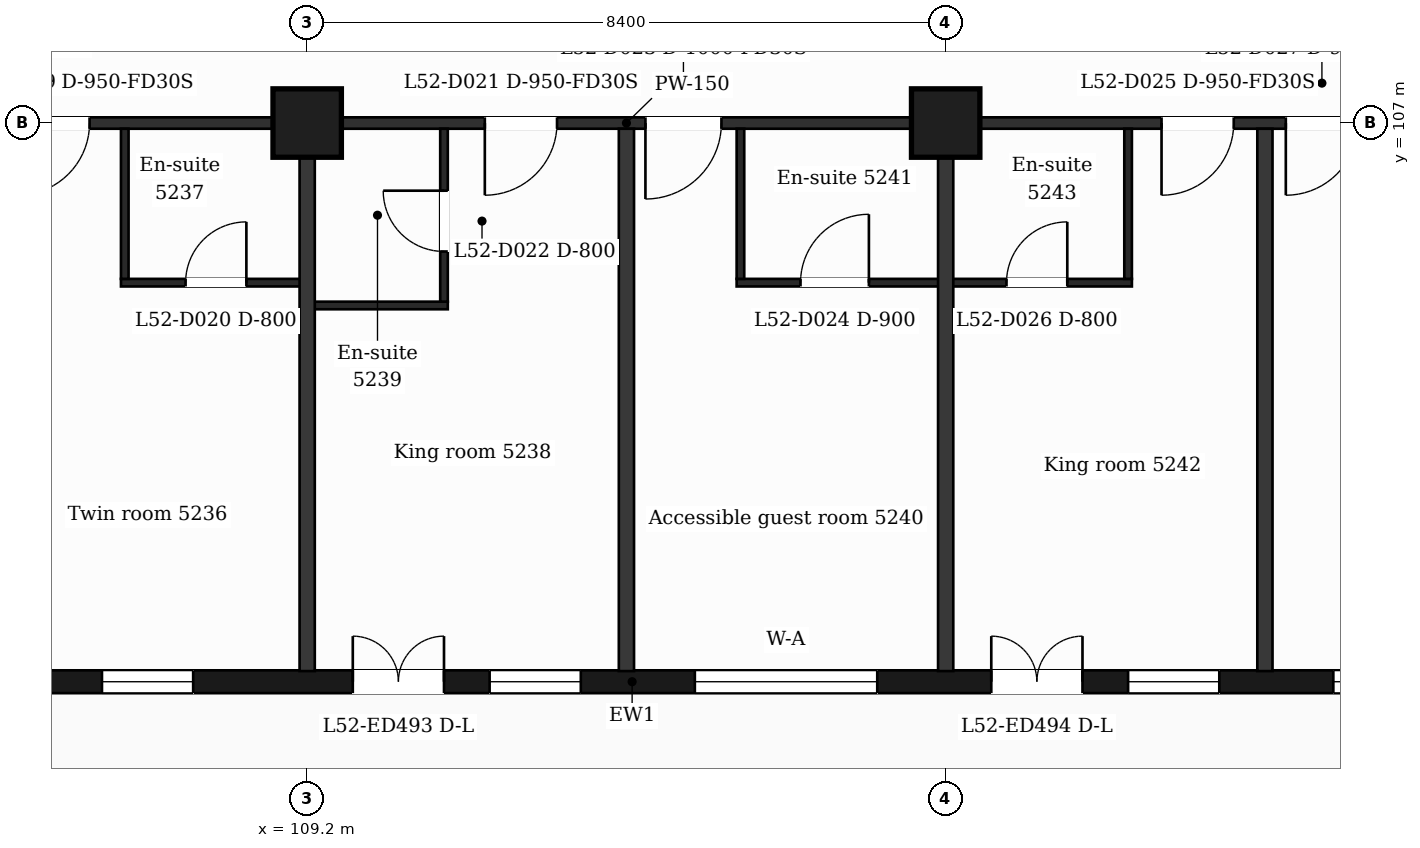
"""IFC4 building model, lengths in metres.
Left out: names, types, materials, properties, quantities, classifications, styles, units other than length and angle.
Written with IfcOpenShell. Run it as: python <this file> out.ifc"""

import sys

from ifc_helpers import new_model, si_unit, direction, frame, frame_2d, origin, origin_2d, place, context, subcontext, project, spatial, rectangle, extrude, element, fill, save


model = new_model("IFC4")
c1 = context("Model", 3, precision=1e-05, world=origin(), true_north=direction((0.0, 1.0)))
c2 = subcontext(c1, "Body", "Model", "MODEL_VIEW")
j1 = project(units=[si_unit("LENGTHUNIT", "METRE"), si_unit("PLANEANGLEUNIT", "RADIAN")], contexts=[c1])
p1 = place(None, origin())
s1 = spatial("IfcSite", under=j1, at=p1, CompositionType="ELEMENT")
p2 = place(p1, origin())
s2 = spatial("IfcBuilding", under=s1, at=p2, CompositionType="ELEMENT")
p3 = place(p2, frame((0.0, 0.0, 217.0)))
s3 = spatial("IfcBuildingStorey", under=s2, at=p3, CompositionType="ELEMENT", Elevation=217.0)
for number, where, z_axis, x_axis in (
    (1, (109.2, 107.0, 0.0), (0.0, 0.0, 1.0), (1.0, 0.0, 0.0)),
    (2, (117.6, 107.0, 0.0), (0.0, 0.0, 1.0), (1.0, 0.0, 0.0)),
):
    element("IfcColumn", number, at=place(p3, frame(where, z_axis=z_axis, x_axis=x_axis)), inside=s3, PredefinedType="COLUMN", context=c2, shape_type="SweptSolid", body=[
        extrude(rectangle(XDim=0.9, YDim=0.9, at=origin_2d()), origin(), (0.0, 0.0, 1.0), 3.7),
    ])
p4 = place(p3, frame((89.85, 99.65, 0.0), z_axis=(0.0, 0.0, 1.0), x_axis=(1.0, 0.0, 0.0)))
e3 = element("IfcWall", 3, at=p4, inside=s3, PredefinedType="SOLIDWALL", context=c2, shape_type="SweptSolid", body=[
    extrude(rectangle(XDim=47.25, YDim=0.3, at=frame_2d((23.625, 0.0))), origin(), (0.0, 0.0, 1.0), 3.38),
])
p5 = place(p4, frame((0.725, 0.0, 0.9)))
e4 = element("IfcOpeningElement", 4, at=p5, cuts=e3, PredefinedType="OPENING", context=c2, shape_type="SweptSolid", body=[
    extrude(rectangle(XDim=1.2, YDim=2.1, at=frame_2d((0.6, 1.05))), frame((0.0, 0.16, 0.0), z_axis=(0.0, -1.0, 0.0), x_axis=(1.0, 0.0, 0.0)), (0.0, 0.0, 1.0), 0.32),
])
p6 = place(p4, frame((3.45, 0.0, 0.9)))
e5 = element("IfcOpeningElement", 5, at=p6, cuts=e3, PredefinedType="OPENING", context=c2, shape_type="SweptSolid", body=[
    extrude(rectangle(XDim=2.4, YDim=2.1, at=frame_2d((1.2, 1.05))), frame((0.0, 0.16, 0.0), z_axis=(0.0, -1.0, 0.0), x_axis=(1.0, 0.0, 0.0)), (0.0, 0.0, 1.0), 0.32),
])
p7 = place(p4, frame((7.65, 0.0, 0.9)))
e6 = element("IfcOpeningElement", 6, at=p7, cuts=e3, PredefinedType="OPENING", context=c2, shape_type="SweptSolid", body=[
    extrude(rectangle(XDim=2.4, YDim=2.1, at=frame_2d((1.2, 1.05))), frame((0.0, 0.16, 0.0), z_axis=(0.0, -1.0, 0.0), x_axis=(1.0, 0.0, 0.0)), (0.0, 0.0, 1.0), 0.32),
])
p8 = place(p4, frame((12.45, 0.0, 0.9)))
e7 = element("IfcOpeningElement", 7, at=p8, cuts=e3, PredefinedType="OPENING", context=c2, shape_type="SweptSolid", body=[
    extrude(rectangle(XDim=1.2, YDim=2.1, at=frame_2d((0.6, 1.05))), frame((0.0, 0.16, 0.0), z_axis=(0.0, -1.0, 0.0), x_axis=(1.0, 0.0, 0.0)), (0.0, 0.0, 1.0), 0.32),
])
p9 = place(p4, frame((16.65, 0.0, 0.9)))
e8 = element("IfcOpeningElement", 8, at=p9, cuts=e3, PredefinedType="OPENING", context=c2, shape_type="SweptSolid", body=[
    extrude(rectangle(XDim=1.2, YDim=2.1, at=frame_2d((0.6, 1.05))), frame((0.0, 0.16, 0.0), z_axis=(0.0, -1.0, 0.0), x_axis=(1.0, 0.0, 0.0)), (0.0, 0.0, 1.0), 0.32),
])
p10 = place(p4, frame((19.95, 0.0, 0.0)))
e9 = element("IfcOpeningElement", 9, at=p10, cuts=e3, PredefinedType="OPENING", context=c2, shape_type="SweptSolid", body=[
    extrude(rectangle(XDim=1.2, YDim=2.4, at=frame_2d((0.6, 1.2))), frame((0.0, 0.16, 0.0), z_axis=(0.0, -1.0, 0.0), x_axis=(1.0, 0.0, 0.0)), (0.0, 0.0, 1.0), 0.32),
])
p11 = place(p4, frame((21.75, 0.0, 0.9)))
e10 = element("IfcOpeningElement", 10, at=p11, cuts=e3, PredefinedType="OPENING", context=c2, shape_type="SweptSolid", body=[
    extrude(rectangle(XDim=1.2, YDim=2.1, at=frame_2d((0.6, 1.05))), frame((0.0, 0.16, 0.0), z_axis=(0.0, -1.0, 0.0), x_axis=(1.0, 0.0, 0.0)), (0.0, 0.0, 1.0), 0.32),
])
p12 = place(p4, frame((24.45, 0.0, 0.9)))
e11 = element("IfcOpeningElement", 11, at=p12, cuts=e3, PredefinedType="OPENING", context=c2, shape_type="SweptSolid", body=[
    extrude(rectangle(XDim=2.4, YDim=2.1, at=frame_2d((1.2, 1.05))), frame((0.0, 0.16, 0.0), z_axis=(0.0, -1.0, 0.0), x_axis=(1.0, 0.0, 0.0)), (0.0, 0.0, 1.0), 0.32),
])
p13 = place(p4, frame((28.35, 0.0, 0.0)))
e12 = element("IfcOpeningElement", 12, at=p13, cuts=e3, PredefinedType="OPENING", context=c2, shape_type="SweptSolid", body=[
    extrude(rectangle(XDim=1.2, YDim=2.4, at=frame_2d((0.6, 1.2))), frame((0.0, 0.16, 0.0), z_axis=(0.0, -1.0, 0.0), x_axis=(1.0, 0.0, 0.0)), (0.0, 0.0, 1.0), 0.32),
])
p14 = place(p4, frame((30.15, 0.0, 0.9)))
e13 = element("IfcOpeningElement", 13, at=p14, cuts=e3, PredefinedType="OPENING", context=c2, shape_type="SweptSolid", body=[
    extrude(rectangle(XDim=1.2, YDim=2.1, at=frame_2d((0.6, 1.05))), frame((0.0, 0.16, 0.0), z_axis=(0.0, -1.0, 0.0), x_axis=(1.0, 0.0, 0.0)), (0.0, 0.0, 1.0), 0.32),
])
p15 = place(p4, frame((32.85, 0.0, 0.9)))
e14 = element("IfcOpeningElement", 14, at=p15, cuts=e3, PredefinedType="OPENING", context=c2, shape_type="SweptSolid", body=[
    extrude(rectangle(XDim=2.4, YDim=2.1, at=frame_2d((1.2, 1.05))), frame((0.0, 0.16, 0.0), z_axis=(0.0, -1.0, 0.0), x_axis=(1.0, 0.0, 0.0)), (0.0, 0.0, 1.0), 0.32),
])
p16 = place(p4, frame((37.05, 0.0, 0.9)))
e15 = element("IfcOpeningElement", 15, at=p16, cuts=e3, PredefinedType="OPENING", context=c2, shape_type="SweptSolid", body=[
    extrude(rectangle(XDim=2.4, YDim=2.1, at=frame_2d((1.2, 1.05))), frame((0.0, 0.16, 0.0), z_axis=(0.0, -1.0, 0.0), x_axis=(1.0, 0.0, 0.0)), (0.0, 0.0, 1.0), 0.32),
])
p17 = place(p4, frame((41.85, 0.0, 0.9)))
e16 = element("IfcOpeningElement", 16, at=p17, cuts=e3, PredefinedType="OPENING", context=c2, shape_type="SweptSolid", body=[
    extrude(rectangle(XDim=1.2, YDim=2.1, at=frame_2d((0.6, 1.05))), frame((0.0, 0.16, 0.0), z_axis=(0.0, -1.0, 0.0), x_axis=(1.0, 0.0, 0.0)), (0.0, 0.0, 1.0), 0.32),
])
p18 = place(p4, frame((45.25, 0.0, 0.9)))
e17 = element("IfcOpeningElement", 17, at=p18, cuts=e3, PredefinedType="OPENING", context=c2, shape_type="SweptSolid", body=[
    extrude(rectangle(XDim=1.2, YDim=2.1, at=frame_2d((0.6, 1.05))), frame((0.0, 0.16, 0.0), z_axis=(0.0, -1.0, 0.0), x_axis=(1.0, 0.0, 0.0)), (0.0, 0.0, 1.0), 0.32),
])
p19 = place(p3, frame((109.2, 104.6, 0.0), z_axis=(0.0, 0.0, 1.0), x_axis=(1.0, 0.0, 0.0)))
e18 = element("IfcWall", 18, at=p19, inside=s3, PredefinedType="PARTITIONING", context=c2, shape_type="SweptSolid", body=[
    extrude(rectangle(XDim=1.85, YDim=0.1, at=frame_2d((0.925, 0.0))), origin(), (0.0, 0.0, 1.0), 3.38),
])
p20 = place(p3, frame((106.75, 104.9, 0.0), z_axis=(0.0, 0.0, 1.0), x_axis=(1.0, 0.0, 0.0)))
e19 = element("IfcWall", 19, at=p20, inside=s3, PredefinedType="PARTITIONING", context=c2, shape_type="SweptSolid", body=[
    extrude(rectangle(XDim=2.45, YDim=0.1, at=frame_2d((1.225, 0.0))), origin(), (0.0, 0.0, 1.0), 3.38),
])
p21 = place(p20, frame((0.85, 0.0, 0.0)))
e20 = element("IfcOpeningElement", 20, at=p21, cuts=e19, PredefinedType="OPENING", context=c2, shape_type="SweptSolid", body=[
    extrude(rectangle(XDim=0.8, YDim=2.1, at=frame_2d((0.4, 1.05))), frame((0.0, 0.06, 0.0), z_axis=(0.0, -1.0, 0.0), x_axis=(1.0, 0.0, 0.0)), (0.0, 0.0, 1.0), 0.12),
])
p22 = place(p3, frame((114.85, 104.9, 0.0), z_axis=(0.0, 0.0, 1.0), x_axis=(1.0, 0.0, 0.0)))
e21 = element("IfcWall", 21, at=p22, inside=s3, PredefinedType="PARTITIONING", context=c2, shape_type="SweptSolid", body=[
    extrude(rectangle(XDim=5.2, YDim=0.1, at=frame_2d((2.6, 0.0))), origin(), (0.0, 0.0, 1.0), 3.38),
])
p23 = place(p22, frame((0.84, 0.0, 0.0)))
e22 = element("IfcOpeningElement", 22, at=p23, cuts=e21, PredefinedType="OPENING", context=c2, shape_type="SweptSolid", body=[
    extrude(rectangle(XDim=0.9, YDim=2.1, at=frame_2d((0.45, 1.05))), frame((0.0, 0.06, 0.0), z_axis=(0.0, -1.0, 0.0), x_axis=(1.0, 0.0, 0.0)), (0.0, 0.0, 1.0), 0.12),
])
p24 = place(p22, frame((3.55, 0.0, 0.0)))
e23 = element("IfcOpeningElement", 23, at=p24, cuts=e21, PredefinedType="OPENING", context=c2, shape_type="SweptSolid", body=[
    extrude(rectangle(XDim=0.8, YDim=2.1, at=frame_2d((0.4, 1.05))), frame((0.0, 0.06, 0.0), z_axis=(0.0, -1.0, 0.0), x_axis=(1.0, 0.0, 0.0)), (0.0, 0.0, 1.0), 0.12),
])
p25 = place(p3, frame((87.018, 107.0, 0.0), z_axis=(0.0, 0.0, 1.0), x_axis=(1.0, 0.0, 0.0)))
e24 = element("IfcWall", 24, at=p25, inside=s3, PredefinedType="PARTITIONING", context=c2, shape_type="SweptSolid", body=[
    extrude(rectangle(XDim=52.765, YDim=0.15, at=frame_2d((26.382, 0.0))), origin(), (0.0, 0.0, 1.0), 3.38),
])
p26 = place(p25, frame((1.276, 0.0, 0.0)))
e25 = element("IfcOpeningElement", 25, at=p26, cuts=e24, PredefinedType="OPENING", context=c2, shape_type="SweptSolid", body=[
    extrude(rectangle(XDim=0.95, YDim=2.1, at=frame_2d((0.475, 1.05))), frame((0.0, 0.085, 0.0), z_axis=(0.0, -1.0, 0.0), x_axis=(1.0, 0.0, 0.0)), (0.0, 0.0, 1.0), 0.17),
])
p27 = place(p25, frame((6.034, 0.0, 0.0)))
e26 = element("IfcOpeningElement", 26, at=p27, cuts=e24, PredefinedType="OPENING", context=c2, shape_type="SweptSolid", body=[
    extrude(rectangle(XDim=0.95, YDim=2.1, at=frame_2d((0.475, 1.05))), frame((0.0, 0.085, 0.0), z_axis=(0.0, -1.0, 0.0), x_axis=(1.0, 0.0, 0.0)), (0.0, 0.0, 1.0), 0.17),
])
p28 = place(p25, frame((15.445, 0.0, 0.0)))
e27 = element("IfcOpeningElement", 27, at=p28, cuts=e24, PredefinedType="OPENING", context=c2, shape_type="SweptSolid", body=[
    extrude(rectangle(XDim=0.95, YDim=2.1, at=frame_2d((0.475, 1.05))), frame((0.0, 0.085, 0.0), z_axis=(0.0, -1.0, 0.0), x_axis=(1.0, 0.0, 0.0)), (0.0, 0.0, 1.0), 0.17),
])
p29 = place(p25, frame((18.369, 0.0, 0.0)))
e28 = element("IfcOpeningElement", 28, at=p29, cuts=e24, PredefinedType="OPENING", context=c2, shape_type="SweptSolid", body=[
    extrude(rectangle(XDim=0.95, YDim=2.1, at=frame_2d((0.475, 1.05))), frame((0.0, 0.085, 0.0), z_axis=(0.0, -1.0, 0.0), x_axis=(1.0, 0.0, 0.0)), (0.0, 0.0, 1.0), 0.17),
])
p30 = place(p25, frame((24.519, 0.0, 0.0)))
e29 = element("IfcOpeningElement", 29, at=p30, cuts=e24, PredefinedType="OPENING", context=c2, shape_type="SweptSolid", body=[
    extrude(rectangle(XDim=0.95, YDim=2.1, at=frame_2d((0.475, 1.05))), frame((0.0, 0.085, 0.0), z_axis=(0.0, -1.0, 0.0), x_axis=(1.0, 0.0, 0.0)), (0.0, 0.0, 1.0), 0.17),
])
p31 = place(p25, frame((26.632, 0.0, 0.0)))
e30 = element("IfcOpeningElement", 30, at=p31, cuts=e24, PredefinedType="OPENING", context=c2, shape_type="SweptSolid", body=[
    extrude(rectangle(XDim=1.0, YDim=2.1, at=frame_2d((0.5, 1.05))), frame((0.0, 0.085, 0.0), z_axis=(0.0, -1.0, 0.0), x_axis=(1.0, 0.0, 0.0)), (0.0, 0.0, 1.0), 0.17),
])
p32 = place(p25, frame((33.422, 0.0, 0.0)))
e31 = element("IfcOpeningElement", 31, at=p32, cuts=e24, PredefinedType="OPENING", context=c2, shape_type="SweptSolid", body=[
    extrude(rectangle(XDim=0.95, YDim=2.1, at=frame_2d((0.475, 1.05))), frame((0.0, 0.085, 0.0), z_axis=(0.0, -1.0, 0.0), x_axis=(1.0, 0.0, 0.0)), (0.0, 0.0, 1.0), 0.17),
])
p33 = place(p25, frame((35.057, 0.0, 0.0)))
e32 = element("IfcOpeningElement", 32, at=p33, cuts=e24, PredefinedType="OPENING", context=c2, shape_type="SweptSolid", body=[
    extrude(rectangle(XDim=0.95, YDim=2.1, at=frame_2d((0.475, 1.05))), frame((0.0, 0.085, 0.0), z_axis=(0.0, -1.0, 0.0), x_axis=(1.0, 0.0, 0.0)), (0.0, 0.0, 1.0), 0.17),
])
p34 = place(p25, frame((44.532, 0.0, 0.0)))
e33 = element("IfcOpeningElement", 33, at=p34, cuts=e24, PredefinedType="OPENING", context=c2, shape_type="SweptSolid", body=[
    extrude(rectangle(XDim=1.0, YDim=2.1, at=frame_2d((0.5, 1.05))), frame((0.0, 0.085, 0.0), z_axis=(0.0, -1.0, 0.0), x_axis=(1.0, 0.0, 0.0)), (0.0, 0.0, 1.0), 0.17),
])
p35 = place(p25, frame((48.249, 0.0, 0.0)))
e34 = element("IfcOpeningElement", 34, at=p35, cuts=e24, PredefinedType="OPENING", context=c2, shape_type="SweptSolid", body=[
    extrude(rectangle(XDim=0.95, YDim=2.1, at=frame_2d((0.475, 1.05))), frame((0.0, 0.085, 0.0), z_axis=(0.0, -1.0, 0.0), x_axis=(1.0, 0.0, 0.0)), (0.0, 0.0, 1.0), 0.17),
])
p36 = place(p3, frame((106.8, 104.95, 0.0), z_axis=(0.0, 0.0, 1.0), x_axis=(0.0, 1.0, 0.0)))
e35 = element("IfcWall", 35, at=p36, inside=s3, PredefinedType="PARTITIONING", context=c2, shape_type="SweptSolid", body=[
    extrude(rectangle(XDim=1.975, YDim=0.1, at=frame_2d((0.988, 0.0))), origin(), (0.0, 0.0, 1.0), 3.38),
])
p37 = place(p3, frame((109.2, 99.79, 0.0), z_axis=(0.0, 0.0, 1.0), x_axis=(0.0, 1.0, 0.0)))
e36 = element("IfcWall", 36, at=p37, inside=s3, PredefinedType="PARTITIONING", context=c2, shape_type="SweptSolid", body=[
    extrude(rectangle(XDim=7.135, YDim=0.2, at=frame_2d((3.567, 0.0))), origin(), (0.0, 0.0, 1.0), 3.38),
])
p38 = place(p3, frame((111.0, 104.65, 0.0), z_axis=(0.0, 0.0, 1.0), x_axis=(0.0, 1.0, 0.0)))
e37 = element("IfcWall", 37, at=p38, inside=s3, PredefinedType="PARTITIONING", context=c2, shape_type="SweptSolid", body=[
    extrude(rectangle(XDim=2.275, YDim=0.1, at=frame_2d((1.138, 0.0))), origin(), (0.0, 0.0, 1.0), 3.38),
])
p39 = place(p38, frame((0.66, 0.0, 0.0)))
e38 = element("IfcOpeningElement", 38, at=p39, cuts=e37, PredefinedType="OPENING", context=c2, shape_type="SweptSolid", body=[
    extrude(rectangle(XDim=0.8, YDim=2.1, at=frame_2d((0.4, 1.05))), frame((0.0, 0.06, 0.0), z_axis=(0.0, -1.0, 0.0), x_axis=(1.0, 0.0, 0.0)), (0.0, 0.0, 1.0), 0.12),
])
p40 = place(p3, frame((113.4, 99.79, 0.0), z_axis=(0.0, 0.0, 1.0), x_axis=(0.0, 1.0, 0.0)))
e39 = element("IfcWall", 39, at=p40, inside=s3, PredefinedType="PARTITIONING", context=c2, shape_type="SweptSolid", body=[
    extrude(rectangle(XDim=7.135, YDim=0.2, at=frame_2d((3.567, 0.0))), origin(), (0.0, 0.0, 1.0), 3.38),
])
p41 = place(p3, frame((114.9, 104.95, 0.0), z_axis=(0.0, 0.0, 1.0), x_axis=(0.0, 1.0, 0.0)))
e40 = element("IfcWall", 40, at=p41, inside=s3, PredefinedType="PARTITIONING", context=c2, shape_type="SweptSolid", body=[
    extrude(rectangle(XDim=1.975, YDim=0.1, at=frame_2d((0.988, 0.0))), origin(), (0.0, 0.0, 1.0), 3.38),
])
p42 = place(p3, frame((117.6, 99.79, 0.0), z_axis=(0.0, 0.0, 1.0), x_axis=(0.0, 1.0, 0.0)))
e41 = element("IfcWall", 41, at=p42, inside=s3, PredefinedType="PARTITIONING", context=c2, shape_type="SweptSolid", body=[
    extrude(rectangle(XDim=7.135, YDim=0.2, at=frame_2d((3.567, 0.0))), origin(), (0.0, 0.0, 1.0), 3.38),
])
p43 = place(p3, frame((120.0, 104.95, 0.0), z_axis=(0.0, 0.0, 1.0), x_axis=(0.0, 1.0, 0.0)))
e42 = element("IfcWall", 42, at=p43, inside=s3, PredefinedType="PARTITIONING", context=c2, shape_type="SweptSolid", body=[
    extrude(rectangle(XDim=1.975, YDim=0.1, at=frame_2d((0.988, 0.0))), origin(), (0.0, 0.0, 1.0), 3.38),
])
p44 = place(p3, frame((121.8, 99.79, 0.0), z_axis=(0.0, 0.0, 1.0), x_axis=(0.0, 1.0, 0.0)))
e43 = element("IfcWall", 43, at=p44, inside=s3, PredefinedType="PARTITIONING", context=c2, shape_type="SweptSolid", body=[
    extrude(rectangle(XDim=7.135, YDim=0.2, at=frame_2d((3.567, 0.0))), origin(), (0.0, 0.0, 1.0), 3.38),
])
p45 = place(p9, origin())
e44 = element("IfcWindow", 44, at=p45, inside=s3, PartitioningType="SINGLE_PANEL", PredefinedType="WINDOW", context=c2, shape_type="SweptSolid", body=[
    extrude(rectangle(XDim=1.2, YDim=2.1, at=frame_2d((0.6, 1.05))), frame((0.0, 0.03, 0.0), z_axis=(0.0, -1.0, 0.0), x_axis=(1.0, 0.0, 0.0)), (0.0, 0.0, 1.0), 0.06),
])
fill(e8, e44)
p46 = place(p10, origin())
e45 = element("IfcDoor", 45, at=p46, inside=s3, OperationType="DOUBLE_DOOR_SINGLE_SWING", PredefinedType="DOOR", context=c2, shape_type="SweptSolid", body=[
    extrude(rectangle(XDim=1.2, YDim=2.4, at=frame_2d((0.6, 1.2))), frame((0.0, 0.025, 0.0), z_axis=(0.0, -1.0, 0.0), x_axis=(1.0, 0.0, 0.0)), (0.0, 0.0, 1.0), 0.05),
])
fill(e9, e45)
p47 = place(p11, origin())
e46 = element("IfcWindow", 46, at=p47, inside=s3, PartitioningType="SINGLE_PANEL", PredefinedType="WINDOW", context=c2, shape_type="SweptSolid", body=[
    extrude(rectangle(XDim=1.2, YDim=2.1, at=frame_2d((0.6, 1.05))), frame((0.0, 0.03, 0.0), z_axis=(0.0, -1.0, 0.0), x_axis=(1.0, 0.0, 0.0)), (0.0, 0.0, 1.0), 0.06),
])
fill(e10, e46)
p48 = place(p12, origin())
e47 = element("IfcWindow", 47, at=p48, inside=s3, PartitioningType="SINGLE_PANEL", PredefinedType="WINDOW", context=c2, shape_type="SweptSolid", body=[
    extrude(rectangle(XDim=2.4, YDim=2.1, at=frame_2d((1.2, 1.05))), frame((0.0, 0.03, 0.0), z_axis=(0.0, -1.0, 0.0), x_axis=(1.0, 0.0, 0.0)), (0.0, 0.0, 1.0), 0.06),
])
fill(e11, e47)
p49 = place(p13, origin())
e48 = element("IfcDoor", 48, at=p49, inside=s3, OperationType="DOUBLE_DOOR_SINGLE_SWING", PredefinedType="DOOR", context=c2, shape_type="SweptSolid", body=[
    extrude(rectangle(XDim=1.2, YDim=2.4, at=frame_2d((0.6, 1.2))), frame((0.0, 0.025, 0.0), z_axis=(0.0, -1.0, 0.0), x_axis=(1.0, 0.0, 0.0)), (0.0, 0.0, 1.0), 0.05),
])
fill(e12, e48)
p50 = place(p14, origin())
e49 = element("IfcWindow", 49, at=p50, inside=s3, PartitioningType="SINGLE_PANEL", PredefinedType="WINDOW", context=c2, shape_type="SweptSolid", body=[
    extrude(rectangle(XDim=1.2, YDim=2.1, at=frame_2d((0.6, 1.05))), frame((0.0, 0.03, 0.0), z_axis=(0.0, -1.0, 0.0), x_axis=(1.0, 0.0, 0.0)), (0.0, 0.0, 1.0), 0.06),
])
fill(e13, e49)
p51 = place(p15, origin())
e50 = element("IfcWindow", 50, at=p51, inside=s3, PartitioningType="SINGLE_PANEL", PredefinedType="WINDOW", context=c2, shape_type="SweptSolid", body=[
    extrude(rectangle(XDim=2.4, YDim=2.1, at=frame_2d((1.2, 1.05))), frame((0.0, 0.03, 0.0), z_axis=(0.0, -1.0, 0.0), x_axis=(1.0, 0.0, 0.0)), (0.0, 0.0, 1.0), 0.06),
])
fill(e14, e50)
p52 = place(p29, origin())
e51 = element("IfcDoor", 51, at=p52, inside=s3, OperationType="SINGLE_SWING_LEFT", PredefinedType="DOOR", context=c2, shape_type="SweptSolid", body=[
    extrude(rectangle(XDim=0.95, YDim=2.1, at=frame_2d((0.475, 1.05))), frame((0.0, 0.025, 0.0), z_axis=(0.0, -1.0, 0.0), x_axis=(1.0, 0.0, 0.0)), (0.0, 0.0, 1.0), 0.05),
])
fill(e28, e51)
p53 = place(p21, origin())
e52 = element("IfcDoor", 52, at=p53, inside=s3, OperationType="SINGLE_SWING_RIGHT", PredefinedType="DOOR", context=c2, shape_type="SweptSolid", body=[
    extrude(rectangle(XDim=0.8, YDim=2.1, at=frame_2d((0.4, 1.05))), frame((0.0, 0.025, 0.0), z_axis=(0.0, -1.0, 0.0), x_axis=(1.0, 0.0, 0.0)), (0.0, 0.0, 1.0), 0.05),
])
fill(e20, e52)
p54 = place(p30, origin())
e53 = element("IfcDoor", 53, at=p54, inside=s3, OperationType="SINGLE_SWING_LEFT", PredefinedType="DOOR", context=c2, shape_type="SweptSolid", body=[
    extrude(rectangle(XDim=0.95, YDim=2.1, at=frame_2d((0.475, 1.05))), frame((0.0, 0.025, 0.0), z_axis=(0.0, -1.0, 0.0), x_axis=(1.0, 0.0, 0.0)), (0.0, 0.0, 1.0), 0.05),
])
fill(e29, e53)
p55 = place(p39, origin())
e54 = element("IfcDoor", 54, at=p55, inside=s3, OperationType="SINGLE_SWING_RIGHT", PredefinedType="DOOR", context=c2, shape_type="SweptSolid", body=[
    extrude(rectangle(XDim=0.8, YDim=2.1, at=frame_2d((0.4, 1.05))), frame((0.0, 0.025, 0.0), z_axis=(0.0, -1.0, 0.0), x_axis=(1.0, 0.0, 0.0)), (0.0, 0.0, 1.0), 0.05),
])
fill(e38, e54)
p56 = place(p31, origin())
e55 = element("IfcDoor", 55, at=p56, inside=s3, OperationType="SINGLE_SWING_LEFT", PredefinedType="DOOR", context=c2, shape_type="SweptSolid", body=[
    extrude(rectangle(XDim=1.0, YDim=2.1, at=frame_2d((0.5, 1.05))), frame((0.0, 0.025, 0.0), z_axis=(0.0, -1.0, 0.0), x_axis=(1.0, 0.0, 0.0)), (0.0, 0.0, 1.0), 0.05),
])
fill(e30, e55)
p57 = place(p23, origin())
e56 = element("IfcDoor", 56, at=p57, inside=s3, OperationType="SINGLE_SWING_RIGHT", PredefinedType="DOOR", context=c2, shape_type="SweptSolid", body=[
    extrude(rectangle(XDim=0.9, YDim=2.1, at=frame_2d((0.45, 1.05))), frame((0.0, 0.025, 0.0), z_axis=(0.0, -1.0, 0.0), x_axis=(1.0, 0.0, 0.0)), (0.0, 0.0, 1.0), 0.05),
])
fill(e22, e56)
p58 = place(p32, origin())
e57 = element("IfcDoor", 57, at=p58, inside=s3, OperationType="SINGLE_SWING_LEFT", PredefinedType="DOOR", context=c2, shape_type="SweptSolid", body=[
    extrude(rectangle(XDim=0.95, YDim=2.1, at=frame_2d((0.475, 1.05))), frame((0.0, 0.025, 0.0), z_axis=(0.0, -1.0, 0.0), x_axis=(1.0, 0.0, 0.0)), (0.0, 0.0, 1.0), 0.05),
])
fill(e31, e57)
p59 = place(p24, origin())
e58 = element("IfcDoor", 58, at=p59, inside=s3, OperationType="SINGLE_SWING_RIGHT", PredefinedType="DOOR", context=c2, shape_type="SweptSolid", body=[
    extrude(rectangle(XDim=0.8, YDim=2.1, at=frame_2d((0.4, 1.05))), frame((0.0, 0.025, 0.0), z_axis=(0.0, -1.0, 0.0), x_axis=(1.0, 0.0, 0.0)), (0.0, 0.0, 1.0), 0.05),
])
fill(e23, e58)
p60 = place(p33, origin())
e59 = element("IfcDoor", 59, at=p60, inside=s3, OperationType="SINGLE_SWING_LEFT", PredefinedType="DOOR", context=c2, shape_type="SweptSolid", body=[
    extrude(rectangle(XDim=0.95, YDim=2.1, at=frame_2d((0.475, 1.05))), frame((0.0, 0.025, 0.0), z_axis=(0.0, -1.0, 0.0), x_axis=(1.0, 0.0, 0.0)), (0.0, 0.0, 1.0), 0.05),
])
fill(e32, e59)
save(model, sys.argv[1])
